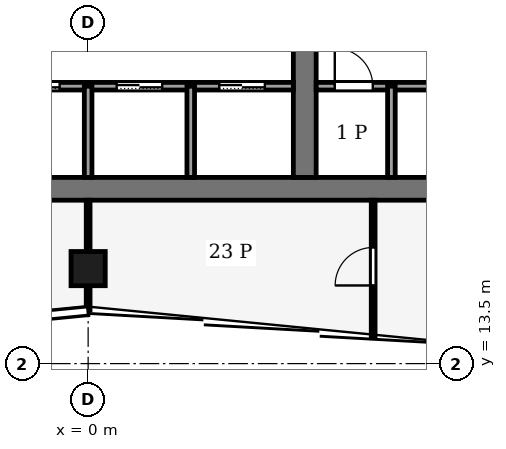
"""IFC4 building model, lengths in metres.
Left out: names, types, materials, properties, quantities, classifications, styles, units other than length and angle.
Written with IfcOpenShell. Run it as: python <this file> out.ifc"""

import sys

from ifc_helpers import new_model, si_unit, direction, frame, frame_2d, origin, origin_2d, place, context, subcontext, project, spatial, rectangle, hollow_rectangle, extrude, element, fill, save


model = new_model("IFC4")
c1 = context("Model", 3, precision=1e-05, world=origin(), true_north=direction((0.0, 1.0)))
c2 = subcontext(c1, "Body", "Model", "MODEL_VIEW")
j1 = project(units=[si_unit("LENGTHUNIT", "METRE"), si_unit("PLANEANGLEUNIT", "RADIAN")], contexts=[c1])
p1 = place(None, origin())
s1 = spatial("IfcSite", under=j1, at=p1, CompositionType="ELEMENT")
p2 = place(p1, origin())
s2 = spatial("IfcBuilding", under=s1, at=p2, CompositionType="ELEMENT")
p3 = place(p2, frame((0.0, 0.0, 314.0)))
s3 = spatial("IfcBuildingStorey", under=s2, at=p3, CompositionType="ELEMENT", Elevation=314.0)
p4 = place(p3, frame((-13.2, 18.1, -0.13), z_axis=(0.0, 0.0, 1.0), x_axis=(1.0, 0.0, 0.0)))
e1 = element("IfcWall", 1, at=p4, inside=s3, PredefinedType="SHEAR", context=c2, shape_type="SweptSolid", body=[
    extrude(rectangle(XDim=26.4, YDim=0.6, at=frame_2d((13.2, 0.0))), origin(), (0.0, 0.0, 1.0), 4.0),
])
p5 = place(p3, frame((5.7, 18.4, -0.13), z_axis=(0.0, 0.0, 1.0), x_axis=(0.0, 1.0, 0.0)))
e2 = element("IfcWall", 2, at=p5, inside=s3, PredefinedType="SHEAR", context=c2, shape_type="SweptSolid", body=[
    extrude(rectangle(XDim=19.2, YDim=0.6, at=frame_2d((9.6, 0.0))), origin(), (0.0, 0.0, 1.0), 4.0),
])
p6 = place(p5, frame((8.35, 0.0, 0.13)))
e3 = element("IfcOpeningElement", 3, at=p6, cuts=e2, PredefinedType="OPENING", context=c2, shape_type="SweptSolid", body=[
    extrude(rectangle(XDim=0.9, YDim=2.1, at=frame_2d((0.45, 1.05))), frame((0.0, 0.31, 0.0), z_axis=(0.0, -1.0, 0.0), x_axis=(1.0, 0.0, 0.0)), (0.0, 0.0, 1.0), 0.62),
])
p7 = place(p5, frame((13.3, 0.0, 0.13)))
e4 = element("IfcOpeningElement", 4, at=p7, cuts=e2, PredefinedType="OPENING", context=c2, shape_type="SweptSolid", body=[
    extrude(rectangle(XDim=2.4, YDim=2.4, at=frame_2d((1.2, 1.2))), frame((0.0, 0.31, 0.0), z_axis=(0.0, -1.0, 0.0), x_axis=(1.0, 0.0, 0.0)), (0.0, 0.0, 1.0), 0.62),
])
p8 = place(p3, frame((0.0, 16.0, 0.0), z_axis=(0.0, 0.0, 1.0), x_axis=(1.0, 0.0, 0.0)))
e5 = element("IfcColumn", 5, at=p8, inside=s3, PredefinedType="COLUMN", context=c2, shape_type="SweptSolid", body=[
    extrude(hollow_rectangle(XDim=0.9, YDim=0.9, WallThickness=0.04, at=origin_2d()), origin(), (0.0, 0.0, 1.0), 4.0),
])
p9 = place(p3, frame((-5.4, 20.8, 0.0), z_axis=(0.0, 0.0, 1.0), x_axis=(1.0, 0.0, 0.0)))
e6 = element("IfcWall", 6, at=p9, inside=s3, PredefinedType="PARTITIONING", context=c2, shape_type="SweptSolid", body=[
    extrude(rectangle(XDim=10.8, YDim=0.2, at=frame_2d((5.4, 0.0))), origin(), (0.0, 0.0, 1.0), 3.87),
])
p10 = place(p9, frame((0.75, 0.0, 0.0)))
e7 = element("IfcOpeningElement", 7, at=p10, cuts=e6, PredefinedType="OPENING", context=c2, shape_type="SweptSolid", body=[
    extrude(rectangle(XDim=1.2, YDim=2.2, at=frame_2d((0.6, 1.1))), frame((0.0, 0.11, 0.0), z_axis=(0.0, -1.0, 0.0), x_axis=(1.0, 0.0, 0.0)), (0.0, 0.0, 1.0), 0.22),
])
p11 = place(p9, frame((3.45, 0.0, 0.0)))
e8 = element("IfcOpeningElement", 8, at=p11, cuts=e6, PredefinedType="OPENING", context=c2, shape_type="SweptSolid", body=[
    extrude(rectangle(XDim=1.2, YDim=2.2, at=frame_2d((0.6, 1.1))), frame((0.0, 0.11, 0.0), z_axis=(0.0, -1.0, 0.0), x_axis=(1.0, 0.0, 0.0)), (0.0, 0.0, 1.0), 0.22),
])
p12 = place(p9, frame((6.15, 0.0, 0.0)))
e9 = element("IfcOpeningElement", 9, at=p12, cuts=e6, PredefinedType="OPENING", context=c2, shape_type="SweptSolid", body=[
    extrude(rectangle(XDim=1.2, YDim=2.2, at=frame_2d((0.6, 1.1))), frame((0.0, 0.11, 0.0), z_axis=(0.0, -1.0, 0.0), x_axis=(1.0, 0.0, 0.0)), (0.0, 0.0, 1.0), 0.22),
])
p13 = place(p9, frame((8.85, 0.0, 0.0)))
e10 = element("IfcOpeningElement", 10, at=p13, cuts=e6, PredefinedType="OPENING", context=c2, shape_type="SweptSolid", body=[
    extrude(rectangle(XDim=1.2, YDim=2.2, at=frame_2d((0.6, 1.1))), frame((0.0, 0.11, 0.0), z_axis=(0.0, -1.0, 0.0), x_axis=(1.0, 0.0, 0.0)), (0.0, 0.0, 1.0), 0.22),
])
p14 = place(p3, frame((6.0, 20.8, 0.0), z_axis=(0.0, 0.0, 1.0), x_axis=(1.0, 0.0, 0.0)))
e11 = element("IfcWall", 11, at=p14, inside=s3, PredefinedType="PARTITIONING", context=c2, shape_type="SweptSolid", body=[
    extrude(rectangle(XDim=6.6, YDim=0.2, at=frame_2d((3.3, 0.0))), origin(), (0.0, 0.0, 1.0), 3.87),
])
p15 = place(p14, frame((0.49, 0.0, 0.0)))
e12 = element("IfcOpeningElement", 12, at=p15, cuts=e11, PredefinedType="OPENING", context=c2, shape_type="SweptSolid", body=[
    extrude(rectangle(XDim=1.0, YDim=2.1, at=frame_2d((0.5, 1.05))), frame((0.0, 0.11, 0.0), z_axis=(0.0, -1.0, 0.0), x_axis=(1.0, 0.0, 0.0)), (0.0, 0.0, 1.0), 0.22),
])
p16 = place(p14, frame((3.79, 0.0, 0.0)))
e13 = element("IfcOpeningElement", 13, at=p16, cuts=e11, PredefinedType="OPENING", context=c2, shape_type="SweptSolid", body=[
    extrude(rectangle(XDim=1.0, YDim=2.1, at=frame_2d((0.5, 1.05))), frame((0.0, 0.11, 0.0), z_axis=(0.0, -1.0, 0.0), x_axis=(1.0, 0.0, 0.0)), (0.0, 0.0, 1.0), 0.22),
])
for number, where, z_axis, x_axis in (
    (14, (0.0, 18.4, 0.0), (0.0, 0.0, 1.0), (0.0, 1.0, 0.0)),
    (15, (2.7, 18.4, 0.0), (0.0, 0.0, 1.0), (0.0, 1.0, 0.0)),
    (16, (7.98, 18.4, 0.0), (0.0, 0.0, 1.0), (0.0, 1.0, 0.0)),
):
    element("IfcWall", number, at=place(p3, frame(where, z_axis=z_axis, x_axis=x_axis)), inside=s3, PredefinedType="PARTITIONING", context=c2, shape_type="SweptSolid", body=[
        extrude(rectangle(XDim=2.4, YDim=0.2, at=frame_2d((1.2, 0.0))), origin(), (0.0, 0.0, 1.0), 3.87),
    ])
p17 = place(p3, frame((0.0, 14.92, 0.0), z_axis=(0.0, 0.0, 1.0), x_axis=(0.0, 1.0, 0.0)))
e17 = element("IfcWall", 17, at=p17, inside=s3, PredefinedType="PARTITIONING", context=c2, shape_type="SweptSolid", body=[
    extrude(rectangle(XDim=2.88, YDim=0.1, at=frame_2d((1.44, 0.0))), origin(), (0.0, 0.0, 1.0), 3.54),
])
p18 = place(p3, frame((7.5, 14.182, 0.0), z_axis=(0.0, 0.0, 1.0), x_axis=(0.0, 1.0, 0.0)))
e18 = element("IfcWall", 18, at=p18, inside=s3, PredefinedType="PARTITIONING", context=c2, shape_type="SweptSolid", body=[
    extrude(rectangle(XDim=3.618, YDim=0.1, at=frame_2d((1.809, 0.0))), origin(), (0.0, 0.0, 1.0), 3.04),
])
p19 = place(p18, frame((1.374, 0.0, 0.0)))
e19 = element("IfcOpeningElement", 19, at=p19, cuts=e18, PredefinedType="OPENING", context=c2, shape_type="SweptSolid", body=[
    extrude(rectangle(XDim=1.0, YDim=2.1, at=frame_2d((0.5, 1.05))), frame((0.0, 0.06, 0.0), z_axis=(0.0, -1.0, 0.0), x_axis=(1.0, 0.0, 0.0)), (0.0, 0.0, 1.0), 0.12),
])
p20 = place(p11, origin())
e20 = element("IfcDoor", 20, at=p20, inside=s3, OperationType="SLIDING_TO_LEFT", PredefinedType="DOOR", context=c2, shape_type="SweptSolid", body=[
    extrude(rectangle(XDim=1.2, YDim=2.2, at=frame_2d((0.6, 1.1))), frame((0.0, 0.025, 0.0), z_axis=(0.0, -1.0, 0.0), x_axis=(1.0, 0.0, 0.0)), (0.0, 0.0, 1.0), 0.05),
])
fill(e8, e20)
p21 = place(p12, origin())
e21 = element("IfcDoor", 21, at=p21, inside=s3, OperationType="SLIDING_TO_LEFT", PredefinedType="DOOR", context=c2, shape_type="SweptSolid", body=[
    extrude(rectangle(XDim=1.2, YDim=2.2, at=frame_2d((0.6, 1.1))), frame((0.0, 0.025, 0.0), z_axis=(0.0, -1.0, 0.0), x_axis=(1.0, 0.0, 0.0)), (0.0, 0.0, 1.0), 0.05),
])
fill(e9, e21)
p22 = place(p13, origin())
e22 = element("IfcDoor", 22, at=p22, inside=s3, OperationType="SLIDING_TO_LEFT", PredefinedType="DOOR", context=c2, shape_type="SweptSolid", body=[
    extrude(rectangle(XDim=1.2, YDim=2.2, at=frame_2d((0.6, 1.1))), frame((0.0, 0.025, 0.0), z_axis=(0.0, -1.0, 0.0), x_axis=(1.0, 0.0, 0.0)), (0.0, 0.0, 1.0), 0.05),
])
fill(e10, e22)
p23 = place(p15, origin())
e23 = element("IfcDoor", 23, at=p23, inside=s3, OperationType="SINGLE_SWING_RIGHT", PredefinedType="DOOR", context=c2, shape_type="SweptSolid", body=[
    extrude(rectangle(XDim=1.0, YDim=2.1, at=frame_2d((0.5, 1.05))), frame((0.0, 0.025, 0.0), z_axis=(0.0, -1.0, 0.0), x_axis=(1.0, 0.0, 0.0)), (0.0, 0.0, 1.0), 0.05),
])
fill(e12, e23)
p24 = place(p19, origin())
e24 = element("IfcDoor", 24, at=p24, inside=s3, OperationType="SINGLE_SWING_RIGHT", PredefinedType="DOOR", context=c2, shape_type="SweptSolid", body=[
    extrude(rectangle(XDim=1.0, YDim=2.1, at=frame_2d((0.5, 1.05))), frame((0.0, 0.025, 0.0), z_axis=(0.0, -1.0, 0.0), x_axis=(1.0, 0.0, 0.0)), (0.0, 0.0, 1.0), 0.05),
])
fill(e19, e24)
save(model, sys.argv[1])
